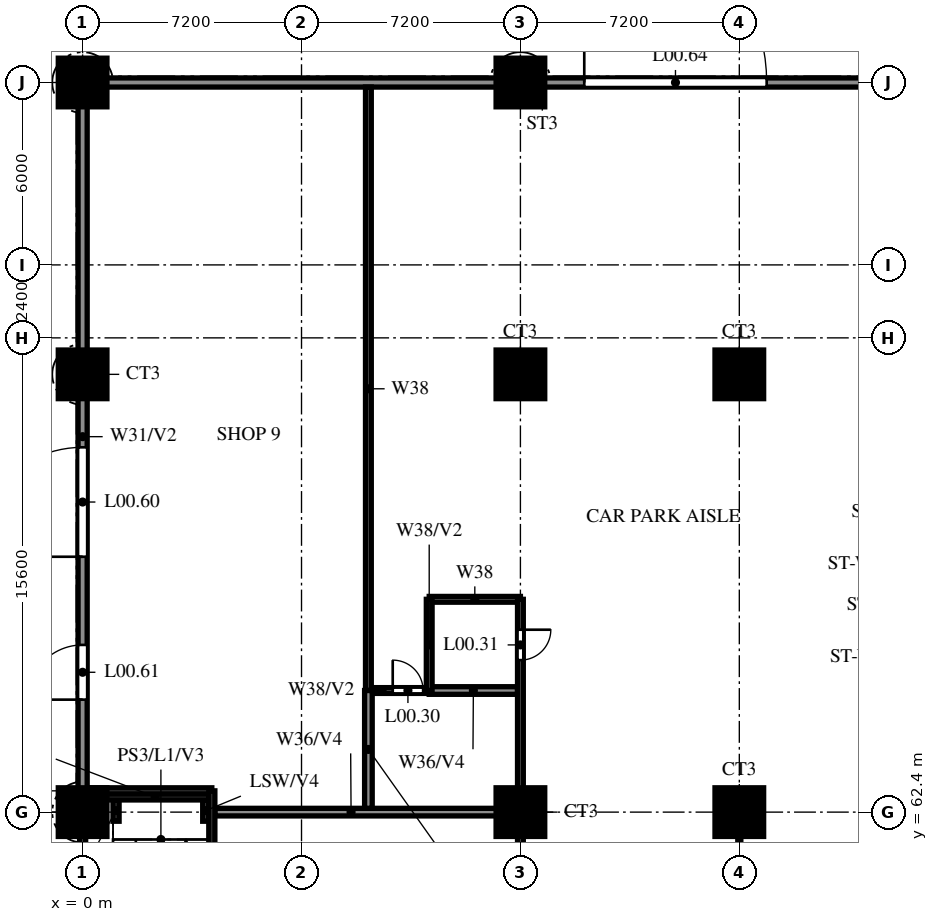
"""IFC4 building model, lengths in metres.
Left out: names, types, materials, properties, quantities, classifications, styles, units other than length and angle.
Written with IfcOpenShell. Run it as: python <this file> out.ifc"""

import sys

from ifc_helpers import new_model, si_unit, direction, frame, frame_2d, origin, origin_2d, place, context, subcontext, project, spatial, rectangle, circle, extrude, source, transform, mapped, element, fill, save


model = new_model("IFC4")
c1 = context("Model", 3, precision=1e-05, world=origin(), true_north=direction((0.0, 1.0)))
c2 = subcontext(c1, "Body", "Model", "MODEL_VIEW")
j1 = project(units=[si_unit("LENGTHUNIT", "METRE"), si_unit("PLANEANGLEUNIT", "RADIAN")], contexts=[c1])
p1 = place(None, origin())
s1 = spatial("IfcSite", under=j1, at=p1, CompositionType="ELEMENT")
p2 = place(p1, origin())
s2 = spatial("IfcBuilding", under=s1, at=p2, CompositionType="ELEMENT")
p3 = place(p2, origin())
s3 = spatial("IfcBuildingStorey", under=s2, at=p3, CompositionType="ELEMENT", Elevation=0.0)
m1 = source(origin(), c2, "Body", "SweptSolid", [
    extrude(circle(Radius=0.8, at=origin_2d()), origin(), (0.0, 0.0, 1.0), 7.4),
])
for number, where, z_axis, x_axis in (
    (1, (0.0, 62.4, 0.0), (0.0, 0.0, 1.0), (1.0, 0.0, 0.0)),
    (2, (14.4, 62.4, 0.0), (0.0, 0.0, 1.0), (1.0, 0.0, 0.0)),
    (3, (21.6, 62.4, 0.0), (0.0, 0.0, 1.0), (1.0, 0.0, 0.0)),
    (4, (0.0, 76.8, 0.0), (0.0, 0.0, 1.0), (1.0, 0.0, 0.0)),
    (5, (14.4, 76.8, 0.0), (0.0, 0.0, 1.0), (1.0, 0.0, 0.0)),
    (6, (21.6, 76.8, 0.0), (0.0, 0.0, 1.0), (1.0, 0.0, 0.0)),
    (7, (0.0, 86.4, 0.0), (0.0, 0.0, 1.0), (1.0, 0.0, 0.0)),
    (8, (14.4, 86.4, 0.0), (0.0, 0.0, 1.0), (1.0, 0.0, 0.0)),
):
    element("IfcColumn", number, at=place(p3, frame(where, z_axis=z_axis, x_axis=x_axis)), inside=s3, PredefinedType="COLUMN", context=c2, shape_type="MappedRepresentation", body=[
        mapped(m1, transform((0.0, 0.0, 0.0))),
    ])
for number, where, z_axis, x_axis in (
    (9, (1.1, 62.1, 0.0), (0.0, 0.0, 1.0), (0.0, 1.0, 0.0)),
    (10, (4.05, 62.1, 0.0), (0.0, 0.0, 1.0), (0.0, 1.0, 0.0)),
):
    element("IfcWall", number, at=place(p3, frame(where, z_axis=z_axis, x_axis=x_axis)), inside=s3, PredefinedType="SOLIDWALL", context=c2, shape_type="SweptSolid", body=[
        extrude(rectangle(XDim=0.7, YDim=0.2, at=frame_2d((0.35, 0.0))), origin(), (0.0, 0.0, 1.0), 3.7),
    ])
p4 = place(p3, frame((0.624, 62.9, 0.0), z_axis=(0.0, 0.0, 1.0), x_axis=(1.0, 0.0, 0.0)))
e11 = element("IfcWall", 11, at=p4, inside=s3, PredefinedType="SOLIDWALL", context=c2, shape_type="SweptSolid", body=[
    extrude(rectangle(XDim=3.526, YDim=0.2, at=frame_2d((1.763, 0.0))), origin(), (0.0, 0.0, 1.0), 3.7),
])
p5 = place(p3, frame((4.35, 62.4, 0.0), z_axis=(0.0, 0.0, 1.0), x_axis=(1.0, 0.0, 0.0)))
e12 = element("IfcWall", 12, at=p5, inside=s3, PredefinedType="SOLIDWALL", context=c2, shape_type="SweptSolid", body=[
    extrude(rectangle(XDim=9.955, YDim=0.25, at=frame_2d((4.978, 0.0))), origin(), (0.0, 0.0, 1.0), 7.4),
])
p6 = place(p3, frame((0.0, 63.1, 0.0), z_axis=(0.0, 0.0, 1.0), x_axis=(1.0, 0.0, 0.0)))
e13 = element("IfcWall", 13, at=p6, inside=s3, PredefinedType="SOLIDWALL", context=c2, shape_type="SweptSolid", body=[
    extrude(rectangle(XDim=4.25, YDim=0.2, at=frame_2d((2.125, 0.0))), origin(), (0.0, 0.0, 1.0), 7.4),
])
p7 = place(p3, frame((9.4, 66.4, 0.0), z_axis=(0.0, 0.0, 1.0), x_axis=(1.0, 0.0, 0.0)))
e14 = element("IfcWall", 14, at=p7, inside=s3, PredefinedType="PARTITIONING", context=c2, shape_type="SweptSolid", body=[
    extrude(rectangle(XDim=2.0, YDim=0.19, at=frame_2d((1.0, 0.0))), origin(), (0.0, 0.0, 1.0), 7.4),
])
p8 = place(p7, frame((0.8, 0.0, 0.0)))
e15 = element("IfcOpeningElement", 15, at=p8, cuts=e14, PredefinedType="OPENING", context=c2, shape_type="SweptSolid", body=[
    extrude(rectangle(XDim=1.0, YDim=2.1, at=frame_2d((0.5, 1.05))), frame((0.0, 0.105, 0.0), z_axis=(0.0, -1.0, 0.0), x_axis=(1.0, 0.0, 0.0)), (0.0, 0.0, 1.0), 0.21),
])
p9 = place(p3, frame((11.4, 66.4, 0.0), z_axis=(0.0, 0.0, 1.0), x_axis=(1.0, 0.0, 0.0)))
e16 = element("IfcWall", 16, at=p9, inside=s3, PredefinedType="SOLIDWALL", context=c2, shape_type="SweptSolid", body=[
    extrude(rectangle(XDim=2.905, YDim=0.25, at=frame_2d((1.453, 0.0))), origin(), (0.0, 0.0, 1.0), 7.4),
])
p10 = place(p3, frame((11.4, 69.4, 0.0), z_axis=(0.0, 0.0, 1.0), x_axis=(1.0, 0.0, 0.0)))
e17 = element("IfcWall", 17, at=p10, inside=s3, PredefinedType="PARTITIONING", context=c2, shape_type="SweptSolid", body=[
    extrude(rectangle(XDim=3.0, YDim=0.19, at=frame_2d((1.5, 0.0))), origin(), (0.0, 0.0, 1.0), 6.2),
])
p11 = place(p3, frame((0.0, 86.4, 0.0), z_axis=(0.0, 0.0, 1.0), x_axis=(1.0, 0.0, 0.0)))
e18 = element("IfcWall", 18, at=p11, inside=s3, PredefinedType="SOLIDWALL", context=c2, shape_type="SweptSolid", body=[
    extrude(rectangle(XDim=100.8, YDim=0.3, at=frame_2d((50.4, 0.0))), origin(), (0.0, 0.0, 1.0), 7.4),
])
p12 = place(p11, frame((16.5, 0.0, 0.0)))
e19 = element("IfcOpeningElement", 19, at=p12, cuts=e18, PredefinedType="OPENING", context=c2, shape_type="SweptSolid", body=[
    extrude(rectangle(XDim=6.0, YDim=3.0, at=frame_2d((3.0, 1.5))), frame((0.0, 0.16, 0.0), z_axis=(0.0, -1.0, 0.0), x_axis=(1.0, 0.0, 0.0)), (0.0, 0.0, 1.0), 0.32),
])
p13 = place(p3, frame((0.0, 63.1, 0.0), z_axis=(0.0, 0.0, 1.0), x_axis=(0.0, 1.0, 0.0)))
e20 = element("IfcWall", 20, at=p13, inside=s3, PredefinedType="SOLIDWALL", context=c2, shape_type="SweptSolid", body=[
    extrude(rectangle(XDim=23.3, YDim=0.3, at=frame_2d((11.65, 0.0))), origin(), (0.0, 0.0, 1.0), 7.4),
])
p14 = place(p13, frame((7.7, 0.0, 0.0)))
e21 = element("IfcOpeningElement", 21, at=p14, cuts=e20, PredefinedType="OPENING", context=c2, shape_type="SweptSolid", body=[
    extrude(rectangle(XDim=3.6, YDim=3.0, at=frame_2d((1.8, 1.5))), frame((0.0, 0.16, 0.0), z_axis=(0.0, -1.0, 0.0), x_axis=(1.0, 0.0, 0.0)), (0.0, 0.0, 1.0), 0.32),
])
p15 = place(p13, frame((3.0, 0.0, 0.0)))
e22 = element("IfcOpeningElement", 22, at=p15, cuts=e20, PredefinedType="OPENING", context=c2, shape_type="SweptSolid", body=[
    extrude(rectangle(XDim=1.8, YDim=2.1, at=frame_2d((0.9, 1.05))), frame((0.0, 0.16, 0.0), z_axis=(0.0, -1.0, 0.0), x_axis=(1.0, 0.0, 0.0)), (0.0, 0.0, 1.0), 0.32),
])
p16 = place(p3, frame((0.0, 54.3, 0.0), z_axis=(0.0, 0.0, 1.0), x_axis=(0.0, 1.0, 0.0)))
e23 = element("IfcWall", 23, at=p16, inside=s3, PredefinedType="SOLIDWALL", context=c2, shape_type="SweptSolid", body=[
    extrude(rectangle(XDim=8.8, YDim=0.2, at=frame_2d((4.4, 0.0))), origin(), (0.0, 0.0, 1.0), 7.4),
])
p17 = place(p16, frame((0.6, 0.0, 0.0)))
e24 = element("IfcOpeningElement", 24, at=p17, cuts=e23, PredefinedType="OPENING", context=c2, shape_type="SweptSolid", body=[
    extrude(rectangle(XDim=1.0, YDim=2.1, at=frame_2d((0.5, 1.05))), frame((0.0, 0.11, 0.0), z_axis=(0.0, -1.0, 0.0), x_axis=(1.0, 0.0, 0.0)), (0.0, 0.0, 1.0), 0.22),
])
p18 = place(p3, frame((4.25, 54.3, 0.0), z_axis=(0.0, 0.0, 1.0), x_axis=(0.0, 1.0, 0.0)))
e25 = element("IfcWall", 25, at=p18, inside=s3, PredefinedType="SOLIDWALL", context=c2, shape_type="SweptSolid", body=[
    extrude(rectangle(XDim=8.8, YDim=0.2, at=frame_2d((4.4, 0.0))), origin(), (0.0, 0.0, 1.0), 7.4),
])
p19 = place(p3, frame((9.4, 66.4, 0.0), z_axis=(0.0, 0.0, 1.0), x_axis=(0.0, 1.0, 0.0)))
e26 = element("IfcWall", 26, at=p19, inside=s3, PredefinedType="PARTITIONING", context=c2, shape_type="SweptSolid", body=[
    extrude(rectangle(XDim=19.85, YDim=0.19, at=frame_2d((9.925, 0.0))), origin(), (0.0, 0.0, 1.0), 6.2),
])
p20 = place(p3, frame((9.4, 62.525, 0.0), z_axis=(0.0, 0.0, 1.0), x_axis=(0.0, 1.0, 0.0)))
e27 = element("IfcWall", 27, at=p20, inside=s3, PredefinedType="SOLIDWALL", context=c2, shape_type="SweptSolid", body=[
    extrude(rectangle(XDim=3.875, YDim=0.25, at=frame_2d((1.938, 0.0))), origin(), (0.0, 0.0, 1.0), 7.4),
])
p21 = place(p3, frame((11.4, 66.4, 0.0), z_axis=(0.0, 0.0, 1.0), x_axis=(0.0, 1.0, 0.0)))
e28 = element("IfcWall", 28, at=p21, inside=s3, PredefinedType="PARTITIONING", context=c2, shape_type="SweptSolid", body=[
    extrude(rectangle(XDim=3.0, YDim=0.19, at=frame_2d((1.5, 0.0))), origin(), (0.0, 0.0, 1.0), 7.4),
])
p22 = place(p3, frame((14.4, 69.4, 0.0), z_axis=(0.0, 0.0, 1.0), x_axis=(0.0, -1.0, 0.0)))
e29 = element("IfcWall", 29, at=p22, inside=s3, PredefinedType="PARTITIONING", context=c2, shape_type="SweptSolid", body=[
    extrude(rectangle(XDim=35.8, YDim=0.19, at=frame_2d((17.9, 0.0))), origin(), (0.0, 0.0, 1.0), 6.2),
])
p23 = place(p22, frame((16.0, 0.0, 0.0)))
e30 = element("IfcOpeningElement", 30, at=p23, cuts=e29, PredefinedType="OPENING", context=c2, shape_type="SweptSolid", body=[
    extrude(rectangle(XDim=1.8, YDim=2.1, at=frame_2d((0.9, 1.05))), frame((0.0, 0.105, 0.0), z_axis=(0.0, -1.0, 0.0), x_axis=(1.0, 0.0, 0.0)), (0.0, 0.0, 1.0), 0.21),
])
p24 = place(p22, frame((10.8, 0.0, 0.0)))
e31 = element("IfcOpeningElement", 31, at=p24, cuts=e29, PredefinedType="OPENING", context=c2, shape_type="SweptSolid", body=[
    extrude(rectangle(XDim=1.2, YDim=2.1, at=frame_2d((0.6, 1.05))), frame((0.0, 0.105, 0.0), z_axis=(0.0, -1.0, 0.0), x_axis=(1.0, 0.0, 0.0)), (0.0, 0.0, 1.0), 0.21),
])
p25 = place(p22, frame((1.0, 0.0, 0.0)))
e32 = element("IfcOpeningElement", 32, at=p25, cuts=e29, PredefinedType="OPENING", context=c2, shape_type="SweptSolid", body=[
    extrude(rectangle(XDim=1.0, YDim=2.1, at=frame_2d((0.5, 1.05))), frame((0.0, 0.105, 0.0), z_axis=(0.0, -1.0, 0.0), x_axis=(1.0, 0.0, 0.0)), (0.0, 0.0, 1.0), 0.21),
])
p26 = place(p3, frame((21.6, 50.1, 0.0), z_axis=(0.0, 0.0, 1.0), x_axis=(0.0, 1.0, 0.0)))
e33 = element("IfcWall", 33, at=p26, inside=s3, PredefinedType="PARTITIONING", context=c2, shape_type="SweptSolid", body=[
    extrude(rectangle(XDim=12.3, YDim=0.1, at=frame_2d((6.15, 0.0))), origin(), (0.0, 0.0, 1.0), 6.2),
])
p27 = place(p26, frame((5.0, 0.0, 0.0)))
e34 = element("IfcOpeningElement", 34, at=p27, cuts=e33, PredefinedType="OPENING", context=c2, shape_type="SweptSolid", body=[
    extrude(rectangle(XDim=2.0, YDim=2.1, at=frame_2d((1.0, 1.05))), frame((0.0, 0.06, 0.0), z_axis=(0.0, -1.0, 0.0), x_axis=(1.0, 0.0, 0.0)), (0.0, 0.0, 1.0), 0.12),
])
p28 = place(p8, origin())
e35 = element("IfcDoor", 35, at=p28, inside=s3, OperationType="SINGLE_SWING_RIGHT", PredefinedType="DOOR", context=c2, shape_type="SweptSolid", body=[
    extrude(rectangle(XDim=1.0, YDim=2.1, at=frame_2d((0.5, 1.05))), frame((0.0, 0.025, 0.0), z_axis=(0.0, -1.0, 0.0), x_axis=(1.0, 0.0, 0.0)), (0.0, 0.0, 1.0), 0.05),
])
fill(e15, e35)
p29 = place(p25, origin())
e36 = element("IfcDoor", 36, at=p29, inside=s3, OperationType="SINGLE_SWING_LEFT", PredefinedType="DOOR", context=c2, shape_type="SweptSolid", body=[
    extrude(rectangle(XDim=1.0, YDim=2.1, at=frame_2d((0.5, 1.05))), frame((0.0, 0.025, 0.0), z_axis=(0.0, -1.0, 0.0), x_axis=(1.0, 0.0, 0.0)), (0.0, 0.0, 1.0), 0.05),
])
fill(e32, e36)
p30 = place(p14, origin())
e37 = element("IfcDoor", 37, at=p30, inside=s3, OperationType="SINGLE_SWING_LEFT", PredefinedType="DOOR", context=c2, shape_type="SweptSolid", body=[
    extrude(rectangle(XDim=3.6, YDim=3.0, at=frame_2d((1.8, 1.5))), frame((0.0, 0.025, 0.0), z_axis=(0.0, -1.0, 0.0), x_axis=(1.0, 0.0, 0.0)), (0.0, 0.0, 1.0), 0.05),
])
fill(e21, e37)
p31 = place(p15, origin())
e38 = element("IfcDoor", 38, at=p31, inside=s3, OperationType="DOUBLE_DOOR_SINGLE_SWING", PredefinedType="DOOR", context=c2, shape_type="SweptSolid", body=[
    extrude(rectangle(XDim=1.8, YDim=2.1, at=frame_2d((0.9, 1.05))), frame((0.0, 0.025, 0.0), z_axis=(0.0, -1.0, 0.0), x_axis=(1.0, 0.0, 0.0)), (0.0, 0.0, 1.0), 0.05),
])
fill(e22, e38)
p32 = place(p12, origin())
e39 = element("IfcDoor", 39, at=p32, inside=s3, OperationType="DOUBLE_DOOR_SINGLE_SWING", PredefinedType="GATE", context=c2, shape_type="SweptSolid", body=[
    extrude(rectangle(XDim=6.0, YDim=3.0, at=frame_2d((3.0, 1.5))), frame((0.0, 0.025, 0.0), z_axis=(0.0, -1.0, 0.0), x_axis=(1.0, 0.0, 0.0)), (0.0, 0.0, 1.0), 0.05),
])
fill(e19, e39)
save(model, sys.argv[1])
